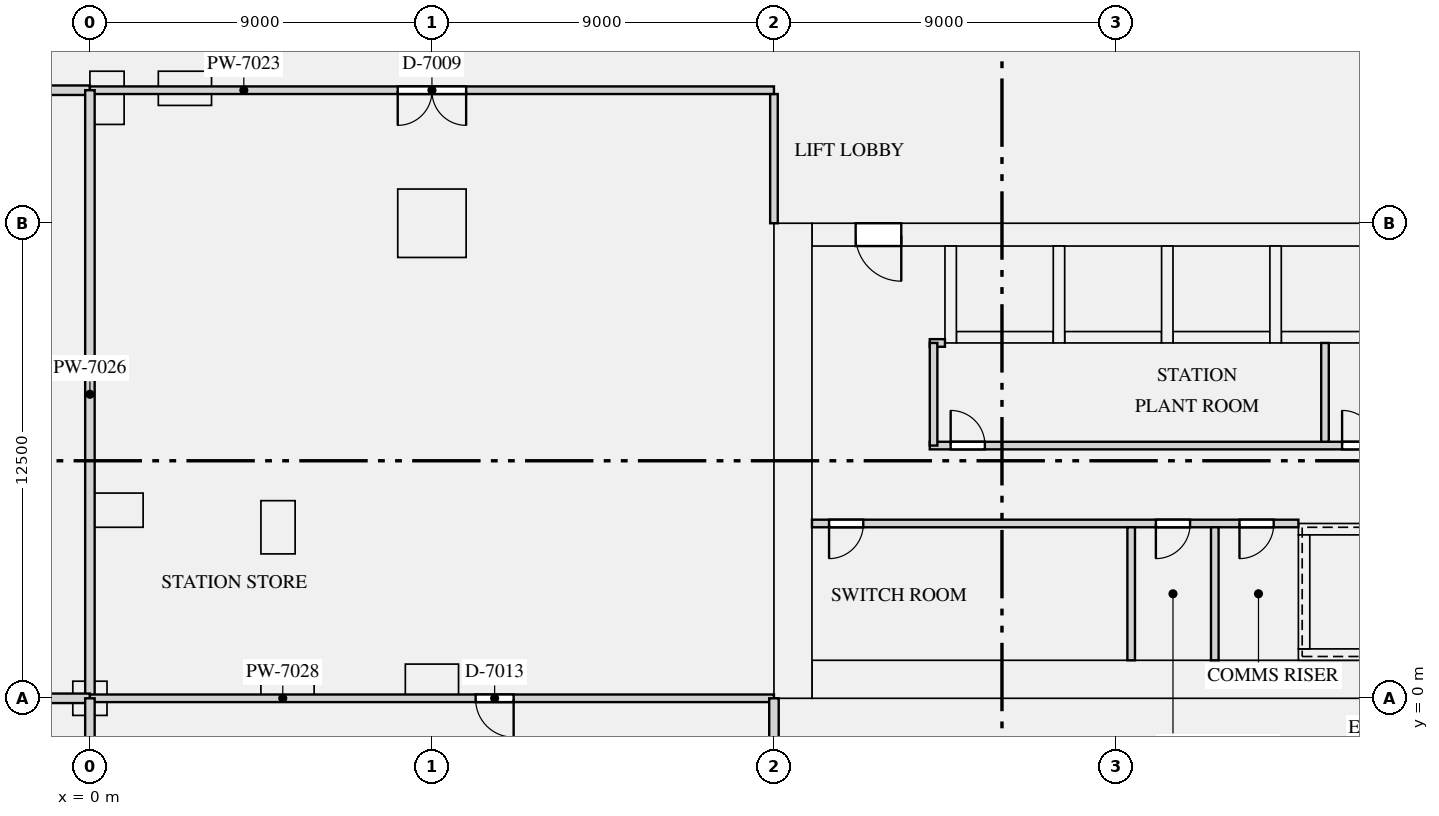
"""IFC4 building model, lengths in metres.
Left out: names, types, materials, properties, quantities, classifications, styles, units other than length and angle.
Written with IfcOpenShell. Run it as: python <this file> out.ifc"""

import sys

from ifc_helpers import new_model, si_unit, direction, frame, frame_2d, origin, origin_with_axes, origin_2d, place, context, subcontext, project, spatial, rectangle, extrude, element, fill, save


model = new_model("IFC4")
c1 = context("Model", 3, precision=1e-05, world=origin(), true_north=direction((0.0, 1.0)))
c2 = subcontext(c1, "Body", "Model", "MODEL_VIEW")
j1 = project(units=[si_unit("LENGTHUNIT", "METRE"), si_unit("PLANEANGLEUNIT", "RADIAN")], contexts=[c1])
p1 = place(None, origin())
s1 = spatial("IfcSite", under=j1, at=p1, CompositionType="ELEMENT")
p2 = place(p1, origin())
s2 = spatial("IfcBuilding", under=s1, at=p2, CompositionType="ELEMENT")
p3 = place(p2, frame((0.0, 0.0, -6.0)))
s3 = spatial("IfcBuildingStorey", under=s2, at=p3, CompositionType="ELEMENT", Elevation=-6.0)
for number, where, z_axis, x_axis in (
    (1, (9.0, 0.45, -0.5), (0.0, 0.0, 1.0), (1.0, 0.0, 0.0)),
    (2, (2.5, 16.05, -0.5), (0.0, 0.0, 1.0), (-1.0, 0.0, 0.0)),
    (3, (0.45, 15.8, -0.5), (0.0, 0.0, 1.0), (0.0, -1.0, 0.0)),
    (4, (0.7, 4.95, -0.5), (0.0, 0.0, 1.0), (1.0, 0.0, 0.0)),
    (5, (4.95, 4.5, -0.5), (0.0, 0.0, 1.0), (0.0, -1.0, 0.0)),
    (6, (5.2, 0.45, -0.5), (0.0, 0.0, 1.0), (1.0, 0.0, 0.0)),
):
    element("IfcColumn", number, at=place(p3, frame(where, z_axis=z_axis, x_axis=x_axis)), inside=s3, PredefinedType="USERDEFINED", context=c2, shape_type="SweptSolid", body=[
        extrude(rectangle(XDim=1.4, YDim=0.9, at=origin_2d()), origin(), (0.0, 0.0, 1.0), 6.5),
    ])
p4 = place(p3, frame((0.0, 0.0, -0.5), z_axis=(0.0, 0.0, 1.0), x_axis=(1.0, 0.0, 0.0)))
e7 = element("IfcColumn", 7, at=p4, inside=s3, PredefinedType="COLUMN", context=c2, shape_type="SweptSolid", body=[
    extrude(rectangle(XDim=0.9, YDim=0.9, at=origin_2d()), origin(), (0.0, 0.0, 1.0), 6.5),
])
p5 = place(p3, frame((9.0, 12.5, -0.5), z_axis=(0.0, 0.0, 1.0), x_axis=(1.0, 0.0, 0.0)))
e8 = element("IfcColumn", 8, at=p5, inside=s3, PredefinedType="COLUMN", context=c2, shape_type="SweptSolid", body=[
    extrude(rectangle(XDim=1.8, YDim=1.8, at=origin_2d()), origin(), (0.0, 0.0, 1.0), 6.5),
])
p6 = place(p3, frame((18.5, 0.0, -0.5), z_axis=(0.0, 0.0, 1.0), x_axis=(0.0, 1.0, 0.0)))
e9 = element("IfcWall", 9, at=p6, inside=s3, PredefinedType="SHEAR", context=c2, shape_type="SweptSolid", body=[
    extrude(rectangle(XDim=12.5, YDim=1.0, at=frame_2d((6.25, 0.0))), origin(), (0.0, 0.0, 1.0), 6.5),
])
p7 = place(p3, frame((19.0, 0.5, -0.5), z_axis=(0.0, 0.0, 1.0), x_axis=(1.0, 0.0, 0.0)))
e10 = element("IfcWall", 10, at=p7, inside=s3, PredefinedType="SHEAR", context=c2, shape_type="SweptSolid", body=[
    extrude(rectangle(XDim=34.0, YDim=1.0, at=frame_2d((17.0, 0.0))), origin(), (0.0, 0.0, 1.0), 6.5),
])
p8 = place(p3, frame((19.0, 12.2, -0.5), z_axis=(0.0, 0.0, 1.0), x_axis=(1.0, 0.0, 0.0)))
e11 = element("IfcWall", 11, at=p8, inside=s3, PredefinedType="SHEAR", context=c2, shape_type="SweptSolid", body=[
    extrude(rectangle(XDim=34.0, YDim=0.6, at=frame_2d((17.0, 0.0))), origin(), (0.0, 0.0, 1.0), 6.5),
])
p9 = place(p8, frame((24.175, 0.0, 0.5)))
e12 = element("IfcOpeningElement", 12, at=p9, cuts=e11, PredefinedType="OPENING", context=c2, shape_type="SweptSolid", body=[
    extrude(rectangle(XDim=1.1, YDim=2.1, at=frame_2d((0.55, 1.05))), frame((0.0, 0.31, 0.0), z_axis=(0.0, -1.0, 0.0), x_axis=(1.0, 0.0, 0.0)), (0.0, 0.0, 1.0), 0.62),
])
p10 = place(p8, frame((26.425, 0.0, 0.5)))
e13 = element("IfcOpeningElement", 13, at=p10, cuts=e11, PredefinedType="OPENING", context=c2, shape_type="SweptSolid", body=[
    extrude(rectangle(XDim=1.1, YDim=2.1, at=frame_2d((0.55, 1.05))), frame((0.0, 0.31, 0.0), z_axis=(0.0, -1.0, 0.0), x_axis=(1.0, 0.0, 0.0)), (0.0, 0.0, 1.0), 0.62),
])
p11 = place(p8, frame((1.15, 0.0, 0.5)))
e14 = element("IfcOpeningElement", 14, at=p11, cuts=e11, PredefinedType="OPENING", context=c2, shape_type="SweptSolid", body=[
    extrude(rectangle(XDim=1.2, YDim=2.1, at=frame_2d((0.6, 1.05))), frame((0.0, 0.31, 0.0), z_axis=(0.0, -1.0, 0.0), x_axis=(1.0, 0.0, 0.0)), (0.0, 0.0, 1.0), 0.62),
])
p12 = place(p8, frame((31.65, 0.0, 0.5)))
e15 = element("IfcOpeningElement", 15, at=p12, cuts=e11, PredefinedType="OPENING", context=c2, shape_type="SweptSolid", body=[
    extrude(rectangle(XDim=1.2, YDim=2.1, at=frame_2d((0.6, 1.05))), frame((0.0, 0.31, 0.0), z_axis=(0.0, -1.0, 0.0), x_axis=(1.0, 0.0, 0.0)), (0.0, 0.0, 1.0), 0.62),
])
p13 = place(p3, frame((22.8, 9.5, -0.5), z_axis=(0.0, 0.0, 1.0), x_axis=(1.0, 0.0, 0.0)))
e16 = element("IfcWall", 16, at=p13, inside=s3, PredefinedType="SHEAR", context=c2, shape_type="SweptSolid", body=[
    extrude(rectangle(XDim=2.55, YDim=0.3, at=frame_2d((1.275, 0.0))), origin(), (0.0, 0.0, 1.0), 6.5),
])
p14 = place(p3, frame((22.65, 9.35, -0.5), z_axis=(0.0, 0.0, 1.0), x_axis=(0.0, 1.0, 0.0)))
e17 = element("IfcWall", 17, at=p14, inside=s3, PredefinedType="SHEAR", context=c2, shape_type="SweptSolid", body=[
    extrude(rectangle(XDim=2.55, YDim=0.3, at=frame_2d((1.275, 0.0))), origin(), (0.0, 0.0, 1.0), 6.5),
])
p15 = place(p3, frame((25.65, 9.5, -0.5), z_axis=(0.0, 0.0, 1.0), x_axis=(1.0, 0.0, 0.0)))
e18 = element("IfcWall", 18, at=p15, inside=s3, PredefinedType="SHEAR", context=c2, shape_type="SweptSolid", body=[
    extrude(rectangle(XDim=2.55, YDim=0.3, at=frame_2d((1.275, 0.0))), origin(), (0.0, 0.0, 1.0), 6.5),
])
p16 = place(p3, frame((25.5, 9.35, -0.5), z_axis=(0.0, 0.0, 1.0), x_axis=(0.0, 1.0, 0.0)))
e19 = element("IfcWall", 19, at=p16, inside=s3, PredefinedType="SHEAR", context=c2, shape_type="SweptSolid", body=[
    extrude(rectangle(XDim=2.55, YDim=0.3, at=frame_2d((1.275, 0.0))), origin(), (0.0, 0.0, 1.0), 6.5),
])
p17 = place(p3, frame((28.5, 9.5, -0.5), z_axis=(0.0, 0.0, 1.0), x_axis=(1.0, 0.0, 0.0)))
e20 = element("IfcWall", 20, at=p17, inside=s3, PredefinedType="SHEAR", context=c2, shape_type="SweptSolid", body=[
    extrude(rectangle(XDim=2.55, YDim=0.3, at=frame_2d((1.275, 0.0))), origin(), (0.0, 0.0, 1.0), 6.5),
])
for number, where, z_axis, x_axis in (
    (21, (28.35, 9.35, -0.5), (0.0, 0.0, 1.0), (0.0, 1.0, 0.0)),
    (22, (31.35, 9.5, -0.5), (0.0, 0.0, 1.0), (1.0, 0.0, 0.0)),
    (23, (31.2, 9.35, -0.5), (0.0, 0.0, 1.0), (0.0, 1.0, 0.0)),
):
    element("IfcWall", number, at=place(p3, frame(where, z_axis=z_axis, x_axis=x_axis)), inside=s3, PredefinedType="SHEAR", context=c2, shape_type="SweptSolid", body=[
        extrude(rectangle(XDim=2.55, YDim=0.3, at=frame_2d((1.275, 0.0))), origin(), (0.0, 0.0, 1.0), 6.5),
    ])
p18 = place(p3, frame((31.8, 1.15, -0.5), z_axis=(0.0, 0.0, 1.0), x_axis=(1.0, 0.0, 0.0)))
e24 = element("IfcWall", 24, at=p18, inside=s3, PredefinedType="SHEAR", context=c2, shape_type="SweptSolid", body=[
    extrude(rectangle(XDim=8.4, YDim=0.3, at=frame_2d((4.2, 0.0))), origin(), (0.0, 0.0, 1.0), 6.5),
])
p19 = place(p3, frame((31.8, 4.45, -0.5), z_axis=(0.0, 0.0, 1.0), x_axis=(1.0, 0.0, 0.0)))
e25 = element("IfcWall", 25, at=p19, inside=s3, PredefinedType="SHEAR", context=c2, shape_type="SweptSolid", body=[
    extrude(rectangle(XDim=8.4, YDim=0.3, at=frame_2d((4.2, 0.0))), origin(), (0.0, 0.0, 1.0), 6.5),
])
p20 = place(p19, frame((6.8, 0.0, 0.5)))
e26 = element("IfcOpeningElement", 26, at=p20, cuts=e25, PredefinedType="OPENING", context=c2, shape_type="SweptSolid", body=[
    extrude(rectangle(XDim=1.1, YDim=2.1, at=frame_2d((0.55, 1.05))), frame((0.0, 0.16, 0.0), z_axis=(0.0, -1.0, 0.0), x_axis=(1.0, 0.0, 0.0)), (0.0, 0.0, 1.0), 0.32),
])
p21 = place(p3, frame((31.95, 1.3, -0.5), z_axis=(0.0, 0.0, 1.0), x_axis=(0.0, 1.0, 0.0)))
e27 = element("IfcWall", 27, at=p21, inside=s3, PredefinedType="SHEAR", context=c2, shape_type="SweptSolid", body=[
    extrude(rectangle(XDim=3.0, YDim=0.3, at=frame_2d((1.5, 0.0))), origin(), (0.0, 0.0, 1.0), 6.5),
])
p22 = place(p3, frame((19.0, 4.6, 0.0), z_axis=(0.0, 0.0, 1.0), x_axis=(1.0, 0.0, 0.0)))
e28 = element("IfcWall", 28, at=p22, inside=s3, PredefinedType="PARTITIONING", context=c2, shape_type="SweptSolid", body=[
    extrude(rectangle(XDim=12.8, YDim=0.2, at=frame_2d((6.4, 0.0))), origin(), (0.0, 0.0, 1.0), 5.598),
])
p23 = place(p22, frame((0.45, 0.0, 0.0)))
e29 = element("IfcOpeningElement", 29, at=p23, cuts=e28, PredefinedType="OPENING", context=c2, shape_type="SweptSolid", body=[
    extrude(rectangle(XDim=0.9, YDim=2.1, at=frame_2d((0.45, 1.05))), frame((0.0, 0.11, 0.0), z_axis=(0.0, -1.0, 0.0), x_axis=(1.0, 0.0, 0.0)), (0.0, 0.0, 1.0), 0.22),
])
p24 = place(p22, frame((9.05, 0.0, 0.0)))
e30 = element("IfcOpeningElement", 30, at=p24, cuts=e28, PredefinedType="OPENING", context=c2, shape_type="SweptSolid", body=[
    extrude(rectangle(XDim=0.9, YDim=2.1, at=frame_2d((0.45, 1.05))), frame((0.0, 0.11, 0.0), z_axis=(0.0, -1.0, 0.0), x_axis=(1.0, 0.0, 0.0)), (0.0, 0.0, 1.0), 0.22),
])
p25 = place(p22, frame((11.25, 0.0, 0.0)))
e31 = element("IfcOpeningElement", 31, at=p25, cuts=e28, PredefinedType="OPENING", context=c2, shape_type="SweptSolid", body=[
    extrude(rectangle(XDim=0.9, YDim=2.1, at=frame_2d((0.45, 1.05))), frame((0.0, 0.11, 0.0), z_axis=(0.0, -1.0, 0.0), x_axis=(1.0, 0.0, 0.0)), (0.0, 0.0, 1.0), 0.22),
])
p26 = place(p3, frame((22.1, 6.65, 0.0), z_axis=(0.0, 0.0, 1.0), x_axis=(1.0, 0.0, 0.0)))
e32 = element("IfcWall", 32, at=p26, inside=s3, PredefinedType="PARTITIONING", context=c2, shape_type="SweptSolid", body=[
    extrude(rectangle(XDim=20.45, YDim=0.2, at=frame_2d((10.225, 0.0))), origin(), (0.0, 0.0, 1.0), 5.598),
])
p27 = place(p26, frame((0.55, 0.0, 0.0)))
e33 = element("IfcOpeningElement", 33, at=p27, cuts=e32, PredefinedType="OPENING", context=c2, shape_type="SweptSolid", body=[
    extrude(rectangle(XDim=0.9, YDim=2.1, at=frame_2d((0.45, 1.05))), frame((0.0, 0.11, 0.0), z_axis=(0.0, -1.0, 0.0), x_axis=(1.0, 0.0, 0.0)), (0.0, 0.0, 1.0), 0.22),
])
p28 = place(p26, frame((10.85, 0.0, 0.0)))
e34 = element("IfcOpeningElement", 34, at=p28, cuts=e32, PredefinedType="OPENING", context=c2, shape_type="SweptSolid", body=[
    extrude(rectangle(XDim=0.9, YDim=2.1, at=frame_2d((0.45, 1.05))), frame((0.0, 0.11, 0.0), z_axis=(0.0, -1.0, 0.0), x_axis=(1.0, 0.0, 0.0)), (0.0, 0.0, 1.0), 0.22),
])
p29 = place(p3, frame((22.1, 9.35, 0.0), z_axis=(0.0, 0.0, 1.0), x_axis=(1.0, 0.0, 0.0)))
e35 = element("IfcWall", 35, at=p29, inside=s3, PredefinedType="PARTITIONING", context=c2, shape_type="SweptSolid", body=[
    extrude(rectangle(XDim=0.4, YDim=0.2, at=frame_2d((0.2, 0.0))), origin(), (0.0, 0.0, 1.0), 5.598),
])
for number, where, z_axis, x_axis in (
    (36, (27.4, 1.0, 0.0), (0.0, 0.0, 1.0), (0.0, 1.0, 0.0)),
    (37, (29.6, 1.0, 0.0), (0.0, 0.0, 1.0), (0.0, 1.0, 0.0)),
):
    element("IfcWall", number, at=place(p3, frame(where, z_axis=z_axis, x_axis=x_axis)), inside=s3, PredefinedType="PARTITIONING", context=c2, shape_type="SweptSolid", body=[
        extrude(rectangle(XDim=3.5, YDim=0.2, at=frame_2d((1.75, 0.0))), origin(), (0.0, 0.0, 1.0), 5.598),
    ])
p30 = place(p3, frame((22.2, 6.65, 0.0), z_axis=(0.0, 0.0, 1.0), x_axis=(0.0, 1.0, 0.0)))
e38 = element("IfcWall", 38, at=p30, inside=s3, PredefinedType="PARTITIONING", context=c2, shape_type="SweptSolid", body=[
    extrude(rectangle(XDim=2.7, YDim=0.2, at=frame_2d((1.35, 0.0))), origin(), (0.0, 0.0, 1.0), 5.598),
])
p31 = place(p3, frame((32.5, 6.75, 0.0), z_axis=(0.0, 0.0, 1.0), x_axis=(0.0, 1.0, 0.0)))
e39 = element("IfcWall", 39, at=p31, inside=s3, PredefinedType="PARTITIONING", context=c2, shape_type="SweptSolid", body=[
    extrude(rectangle(XDim=2.6, YDim=0.2, at=frame_2d((1.3, 0.0))), origin(), (0.0, 0.0, 1.0), 5.598),
])
p32 = place(p3, frame((18.0, 12.5, 0.0), z_axis=(0.0, 0.0, 1.0), x_axis=(0.0, 1.0, 0.0)))
e40 = element("IfcWall", 40, at=p32, inside=s3, PredefinedType="PARTITIONING", context=c2, shape_type="SweptSolid", body=[
    extrude(rectangle(XDim=3.4, YDim=0.2, at=frame_2d((1.7, 0.0))), origin(), (0.0, 0.0, 1.0), 5.598),
])
p33 = place(p3, frame((-18.0, 16.0, 0.0), z_axis=(0.0, 0.0, 1.0), x_axis=(1.0, 0.0, 0.0)))
e41 = element("IfcWall", 41, at=p33, inside=s3, PredefinedType="PARTITIONING", context=c2, shape_type="SweptSolid", body=[
    extrude(rectangle(XDim=18.0, YDim=0.25, at=frame_2d((9.0, 0.0))), origin(), (0.0, 0.0, 1.0), 5.598),
])
p34 = place(p33, frame((8.1, 0.0, 0.0)))
e42 = element("IfcOpeningElement", 42, at=p34, cuts=e41, PredefinedType="OPENING", context=c2, shape_type="SweptSolid", body=[
    extrude(rectangle(XDim=1.8, YDim=2.4, at=frame_2d((0.9, 1.2))), frame((0.0, 0.135, 0.0), z_axis=(0.0, -1.0, 0.0), x_axis=(1.0, 0.0, 0.0)), (0.0, 0.0, 1.0), 0.27),
])
p35 = place(p3, frame((0.0, 16.0, 0.0), z_axis=(0.0, 0.0, 1.0), x_axis=(1.0, 0.0, 0.0)))
e43 = element("IfcWall", 43, at=p35, inside=s3, PredefinedType="PARTITIONING", context=c2, shape_type="SweptSolid", body=[
    extrude(rectangle(XDim=18.0, YDim=0.2, at=frame_2d((9.0, 0.0))), origin(), (0.0, 0.0, 1.0), 5.598),
])
p36 = place(p35, frame((8.1, 0.0, 0.0)))
e44 = element("IfcOpeningElement", 44, at=p36, cuts=e43, PredefinedType="OPENING", context=c2, shape_type="SweptSolid", body=[
    extrude(rectangle(XDim=1.8, YDim=2.4, at=frame_2d((0.9, 1.2))), frame((0.0, 0.11, 0.0), z_axis=(0.0, -1.0, 0.0), x_axis=(1.0, 0.0, 0.0)), (0.0, 0.0, 1.0), 0.22),
])
p37 = place(p3, frame((0.0, 0.0, 0.0), z_axis=(0.0, 0.0, 1.0), x_axis=(0.0, 1.0, 0.0)))
e45 = element("IfcWall", 45, at=p37, inside=s3, PredefinedType="PARTITIONING", context=c2, shape_type="SweptSolid", body=[
    extrude(rectangle(XDim=16.0, YDim=0.25, at=frame_2d((8.0, 0.0))), origin(), (0.0, 0.0, 1.0), 5.598),
])
p38 = place(p3, frame((-18.0, 0.0, 0.0), z_axis=(0.0, 0.0, 1.0), x_axis=(1.0, 0.0, 0.0)))
e46 = element("IfcWall", 46, at=p38, inside=s3, PredefinedType="PARTITIONING", context=c2, shape_type="SweptSolid", body=[
    extrude(rectangle(XDim=18.0, YDim=0.25, at=frame_2d((9.0, 0.0))), origin(), (0.0, 0.0, 1.0), 5.598),
])
p39 = place(p38, frame((6.3, 0.0, 0.0)))
e47 = element("IfcOpeningElement", 47, at=p39, cuts=e46, PredefinedType="OPENING", context=c2, shape_type="SweptSolid", body=[
    extrude(rectangle(XDim=1.8, YDim=2.4, at=frame_2d((0.9, 1.2))), frame((0.0, 0.135, 0.0), z_axis=(0.0, -1.0, 0.0), x_axis=(1.0, 0.0, 0.0)), (0.0, 0.0, 1.0), 0.27),
])
p40 = place(p3, origin_with_axes())
e48 = element("IfcWall", 48, at=p40, inside=s3, PredefinedType="PARTITIONING", context=c2, shape_type="SweptSolid", body=[
    extrude(rectangle(XDim=18.0, YDim=0.2, at=frame_2d((9.0, 0.0))), origin(), (0.0, 0.0, 1.0), 5.598),
])
p41 = place(p40, frame((10.15, 0.0, 0.0)))
e49 = element("IfcOpeningElement", 49, at=p41, cuts=e48, PredefinedType="OPENING", context=c2, shape_type="SweptSolid", body=[
    extrude(rectangle(XDim=1.0, YDim=2.1, at=frame_2d((0.5, 1.05))), frame((0.0, 0.11, 0.0), z_axis=(0.0, -1.0, 0.0), x_axis=(1.0, 0.0, 0.0)), (0.0, 0.0, 1.0), 0.22),
])
p42 = place(p3, frame((0.0, -9.0, 0.0), z_axis=(0.0, 0.0, 1.0), x_axis=(0.0, 1.0, 0.0)))
e50 = element("IfcWall", 50, at=p42, inside=s3, PredefinedType="PARTITIONING", context=c2, shape_type="SweptSolid", body=[
    extrude(rectangle(XDim=9.0, YDim=0.25, at=frame_2d((4.5, 0.0))), origin(), (0.0, 0.0, 1.0), 5.598),
])
p43 = place(p3, frame((18.0, -9.0, 0.0), z_axis=(0.0, 0.0, 1.0), x_axis=(0.0, 1.0, 0.0)))
e51 = element("IfcWall", 51, at=p43, inside=s3, PredefinedType="PARTITIONING", context=c2, shape_type="SweptSolid", body=[
    extrude(rectangle(XDim=9.0, YDim=0.25, at=frame_2d((4.5, 0.0))), origin(), (0.0, 0.0, 1.0), 5.598),
])
p44 = place(p43, frame((4.0, 0.0, 0.0)))
e52 = element("IfcOpeningElement", 52, at=p44, cuts=e51, PredefinedType="OPENING", context=c2, shape_type="SweptSolid", body=[
    extrude(rectangle(XDim=1.0, YDim=2.1, at=frame_2d((0.5, 1.05))), frame((0.0, 0.135, 0.0), z_axis=(0.0, -1.0, 0.0), x_axis=(1.0, 0.0, 0.0)), (0.0, 0.0, 1.0), 0.27),
])
p45 = place(p27, origin())
e53 = element("IfcDoor", 53, at=p45, inside=s3, OperationType="SINGLE_SWING_LEFT", PredefinedType="DOOR", context=c2, shape_type="SweptSolid", body=[
    extrude(rectangle(XDim=0.9, YDim=2.1, at=frame_2d((0.45, 1.05))), frame((0.0, 0.025, 0.0), z_axis=(0.0, -1.0, 0.0), x_axis=(1.0, 0.0, 0.0)), (0.0, 0.0, 1.0), 0.05),
])
fill(e33, e53)
p46 = place(p28, origin())
e54 = element("IfcDoor", 54, at=p46, inside=s3, OperationType="SINGLE_SWING_LEFT", PredefinedType="DOOR", context=c2, shape_type="SweptSolid", body=[
    extrude(rectangle(XDim=0.9, YDim=2.1, at=frame_2d((0.45, 1.05))), frame((0.0, 0.025, 0.0), z_axis=(0.0, -1.0, 0.0), x_axis=(1.0, 0.0, 0.0)), (0.0, 0.0, 1.0), 0.05),
])
fill(e34, e54)
p47 = place(p23, frame((0.9, 0.0, 0.0), z_axis=(0.0, 0.0, 1.0), x_axis=(-1.0, 0.0, 0.0)))
e55 = element("IfcDoor", 55, at=p47, inside=s3, OperationType="SINGLE_SWING_RIGHT", PredefinedType="DOOR", context=c2, shape_type="SweptSolid", body=[
    extrude(rectangle(XDim=0.9, YDim=2.1, at=frame_2d((0.45, 1.05))), frame((0.0, 0.025, 0.0), z_axis=(0.0, -1.0, 0.0), x_axis=(1.0, 0.0, 0.0)), (0.0, 0.0, 1.0), 0.05),
])
fill(e29, e55)
p48 = place(p24, frame((0.9, 0.0, 0.0), z_axis=(0.0, 0.0, 1.0), x_axis=(-1.0, 0.0, 0.0)))
e56 = element("IfcDoor", 56, at=p48, inside=s3, OperationType="SINGLE_SWING_RIGHT", PredefinedType="DOOR", context=c2, shape_type="SweptSolid", body=[
    extrude(rectangle(XDim=0.9, YDim=2.1, at=frame_2d((0.45, 1.05))), frame((0.0, 0.025, 0.0), z_axis=(0.0, -1.0, 0.0), x_axis=(1.0, 0.0, 0.0)), (0.0, 0.0, 1.0), 0.05),
])
fill(e30, e56)
p49 = place(p25, frame((0.9, 0.0, 0.0), z_axis=(0.0, 0.0, 1.0), x_axis=(-1.0, 0.0, 0.0)))
e57 = element("IfcDoor", 57, at=p49, inside=s3, OperationType="SINGLE_SWING_RIGHT", PredefinedType="DOOR", context=c2, shape_type="SweptSolid", body=[
    extrude(rectangle(XDim=0.9, YDim=2.1, at=frame_2d((0.45, 1.05))), frame((0.0, 0.025, 0.0), z_axis=(0.0, -1.0, 0.0), x_axis=(1.0, 0.0, 0.0)), (0.0, 0.0, 1.0), 0.05),
])
fill(e31, e57)
p50 = place(p11, frame((1.2, 0.0, 0.0), z_axis=(0.0, 0.0, 1.0), x_axis=(-1.0, 0.0, 0.0)))
e58 = element("IfcDoor", 58, at=p50, inside=s3, OperationType="SINGLE_SWING_LEFT", PredefinedType="DOOR", context=c2, shape_type="SweptSolid", body=[
    extrude(rectangle(XDim=1.2, YDim=2.1, at=frame_2d((0.6, 1.05))), frame((0.0, 0.025, 0.0), z_axis=(0.0, -1.0, 0.0), x_axis=(1.0, 0.0, 0.0)), (0.0, 0.0, 1.0), 0.05),
])
fill(e14, e58)
p51 = place(p36, frame((1.8, 0.0, 0.0), z_axis=(0.0, 0.0, 1.0), x_axis=(-1.0, 0.0, 0.0)))
e59 = element("IfcDoor", 59, at=p51, inside=s3, OperationType="DOUBLE_DOOR_SINGLE_SWING", PredefinedType="DOOR", context=c2, shape_type="SweptSolid", body=[
    extrude(rectangle(XDim=1.8, YDim=2.4, at=frame_2d((0.9, 1.2))), frame((0.0, 0.025, 0.0), z_axis=(0.0, -1.0, 0.0), x_axis=(1.0, 0.0, 0.0)), (0.0, 0.0, 1.0), 0.05),
])
fill(e44, e59)
p52 = place(p41, frame((1.0, 0.0, 0.0), z_axis=(0.0, 0.0, 1.0), x_axis=(-1.0, 0.0, 0.0)))
e60 = element("IfcDoor", 60, at=p52, inside=s3, OperationType="SINGLE_SWING_LEFT", PredefinedType="DOOR", context=c2, shape_type="SweptSolid", body=[
    extrude(rectangle(XDim=1.0, YDim=2.1, at=frame_2d((0.5, 1.05))), frame((0.0, 0.025, 0.0), z_axis=(0.0, -1.0, 0.0), x_axis=(1.0, 0.0, 0.0)), (0.0, 0.0, 1.0), 0.05),
])
fill(e49, e60)
save(model, sys.argv[1])
